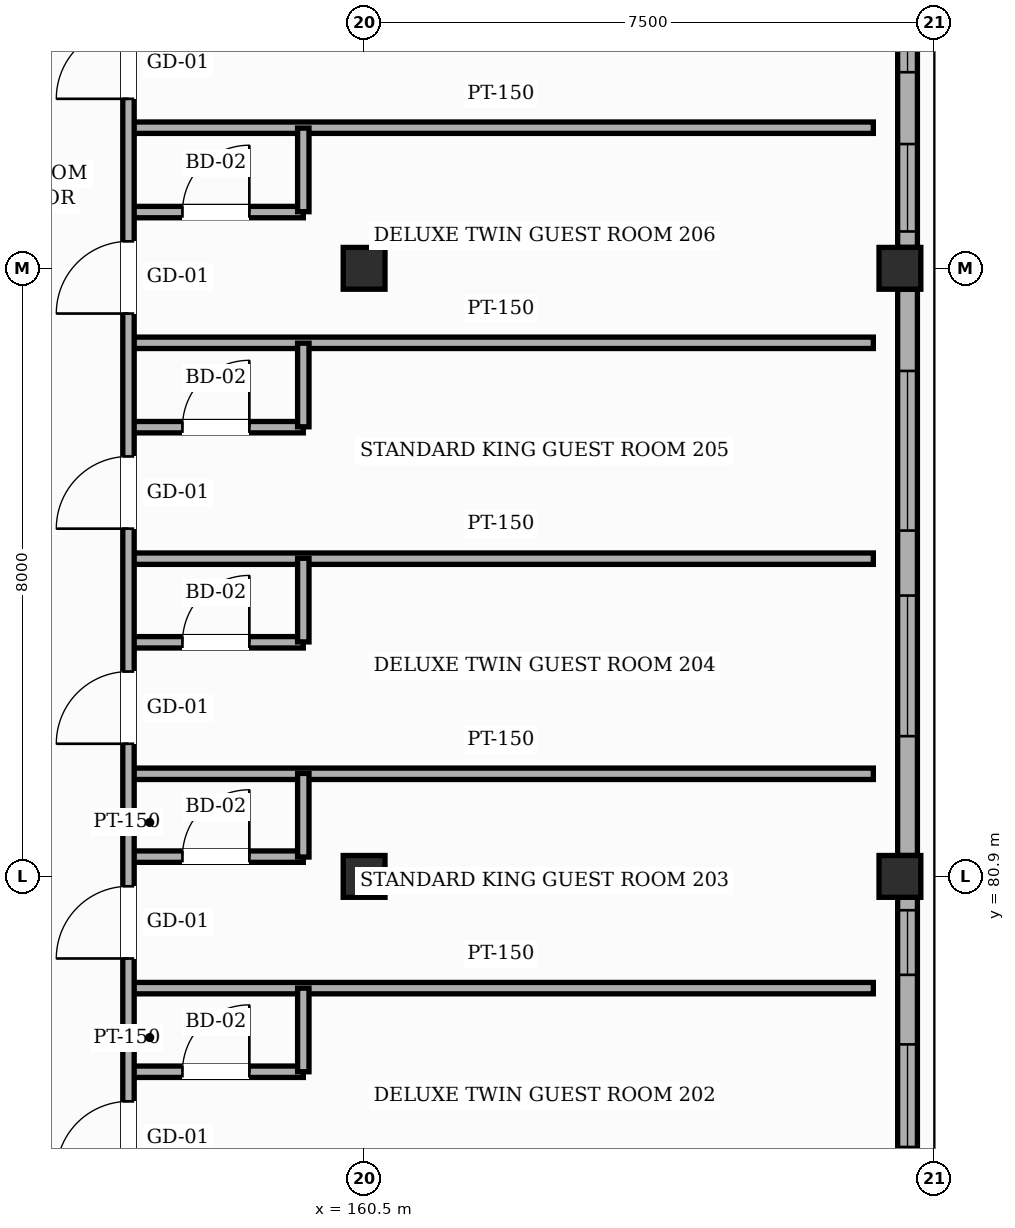
"""IFC4 building model, lengths in metres.
Left out: names, types, materials, properties, quantities, classifications, styles, units other than length and angle.
Written with IfcOpenShell. Run it as: python <this file> out.ifc"""

import sys

from ifc_helpers import new_model, si_unit, direction, frame, frame_2d, origin, origin_2d, place, context, subcontext, project, spatial, rectangle, hollow_rectangle, extrude, element, fill, save


model = new_model("IFC4")
c1 = context("Model", 3, precision=1e-05, world=origin(), true_north=direction((0.0, 1.0)))
c2 = subcontext(c1, "Body", "Model", "MODEL_VIEW")
j1 = project(units=[si_unit("LENGTHUNIT", "METRE"), si_unit("PLANEANGLEUNIT", "RADIAN")], contexts=[c1])
p1 = place(None, origin())
s1 = spatial("IfcSite", under=j1, at=p1, CompositionType="ELEMENT")
p2 = place(p1, origin())
s2 = spatial("IfcBuilding", under=s1, at=p2, CompositionType="ELEMENT")
p3 = place(p2, frame((0.0, 0.0, 31.8)))
s3 = spatial("IfcBuildingStorey", under=s2, at=p3, CompositionType="ELEMENT", Elevation=31.8)
for number, where, z_axis, x_axis in (
    (1, (160.5, 80.9, 0.0), (0.0, 0.0, 1.0), (1.0, 0.0, 0.0)),
    (2, (160.5, 88.9, 0.0), (0.0, 0.0, 1.0), (1.0, 0.0, 0.0)),
    (3, (167.55, 80.9, 0.0), (0.0, 0.0, 1.0), (1.0, 0.0, 0.0)),
    (4, (167.55, 88.9, 0.0), (0.0, 0.0, 1.0), (1.0, 0.0, 0.0)),
):
    element("IfcColumn", number, at=place(p3, frame(where, z_axis=z_axis, x_axis=x_axis)), inside=s3, PredefinedType="COLUMN", context=c2, shape_type="SweptSolid", body=[
        extrude(hollow_rectangle(XDim=0.55, YDim=0.55, WallThickness=0.022, InnerFilletRadius=0.022, OuterFilletRadius=0.044, at=origin_2d()), origin(), (0.0, 0.0, 1.0), 3.6),
    ])
p4 = place(p3, frame((167.65, 80.625, 0.0), z_axis=(0.0, 0.0, 1.0), x_axis=(0.0, -1.0, 0.0)))
e5 = element("IfcWall", 5, at=p4, inside=s3, PredefinedType="SOLIDWALL", context=c2, shape_type="SweptSolid", body=[
    extrude(rectangle(XDim=4.2, YDim=0.26, at=frame_2d((2.1, 0.0))), origin(), (0.0, 0.0, 1.0), 3.365),
])
p5 = place(p4, frame((1.935, 0.0, 0.85)))
e6 = element("IfcOpeningElement", 6, at=p5, cuts=e5, PredefinedType="OPENING", context=c2, shape_type="SweptSolid", body=[
    extrude(rectangle(XDim=1.35, YDim=1.95, at=frame_2d((0.675, 0.975))), frame((0.0, 0.14, 0.0), z_axis=(0.0, -1.0, 0.0), x_axis=(1.0, 0.0, 0.0)), (0.0, 0.0, 1.0), 0.28),
])
p6 = place(p4, frame((0.17, 0.0, 0.85)))
e7 = element("IfcOpeningElement", 7, at=p6, cuts=e5, PredefinedType="OPENING", context=c2, shape_type="SweptSolid", body=[
    extrude(rectangle(XDim=0.85, YDim=1.35, at=frame_2d((0.425, 0.675))), frame((0.0, 0.14, 0.0), z_axis=(0.0, -1.0, 0.0), x_axis=(1.0, 0.0, 0.0)), (0.0, 0.0, 1.0), 0.28),
])
p7 = place(p3, frame((167.65, 88.625, 0.0), z_axis=(0.0, 0.0, 1.0), x_axis=(0.0, -1.0, 0.0)))
e8 = element("IfcWall", 8, at=p7, inside=s3, PredefinedType="SOLIDWALL", context=c2, shape_type="SweptSolid", body=[
    extrude(rectangle(XDim=7.45, YDim=0.26, at=frame_2d((3.725, 0.0))), origin(), (0.0, 0.0, 1.0), 2.755),
])
p8 = place(p7, frame((4.03, 0.0, 0.85)))
e9 = element("IfcOpeningElement", 9, at=p8, cuts=e8, PredefinedType="OPENING", context=c2, shape_type="SweptSolid", body=[
    extrude(rectangle(XDim=1.85, YDim=1.35, at=frame_2d((0.925, 0.675))), frame((0.0, 0.14, 0.0), z_axis=(0.0, -1.0, 0.0), x_axis=(1.0, 0.0, 0.0)), (0.0, 0.0, 1.0), 0.28),
])
p9 = place(p7, frame((1.075, 0.0, 0.85)))
e10 = element("IfcOpeningElement", 10, at=p9, cuts=e8, PredefinedType="OPENING", context=c2, shape_type="SweptSolid", body=[
    extrude(rectangle(XDim=2.1, YDim=1.35, at=frame_2d((1.05, 0.675))), frame((0.0, 0.14, 0.0), z_axis=(0.0, -1.0, 0.0), x_axis=(1.0, 0.0, 0.0)), (0.0, 0.0, 1.0), 0.28),
])
p10 = place(p3, frame((167.65, 96.625, 0.0), z_axis=(0.0, 0.0, 1.0), x_axis=(0.0, -1.0, 0.0)))
e11 = element("IfcWall", 11, at=p10, inside=s3, PredefinedType="SOLIDWALL", context=c2, shape_type="SweptSolid", body=[
    extrude(rectangle(XDim=7.45, YDim=0.26, at=frame_2d((3.725, 0.0))), origin(), (0.0, 0.0, 1.0), 2.755),
])
p11 = place(p10, frame((6.09, 0.0, 0.85)))
e12 = element("IfcOpeningElement", 12, at=p11, cuts=e11, PredefinedType="OPENING", context=c2, shape_type="SweptSolid", body=[
    extrude(rectangle(XDim=1.15, YDim=1.35, at=frame_2d((0.575, 0.675))), frame((0.0, 0.14, 0.0), z_axis=(0.0, -1.0, 0.0), x_axis=(1.0, 0.0, 0.0)), (0.0, 0.0, 1.0), 0.28),
])
p12 = place(p10, frame((3.795, 0.0, 0.85)))
e13 = element("IfcOpeningElement", 13, at=p12, cuts=e11, PredefinedType="OPENING", context=c2, shape_type="SweptSolid", body=[
    extrude(rectangle(XDim=1.35, YDim=1.35, at=frame_2d((0.675, 0.675))), frame((0.0, 0.14, 0.0), z_axis=(0.0, -1.0, 0.0), x_axis=(1.0, 0.0, 0.0)), (0.0, 0.0, 1.0), 0.28),
])
p13 = place(p10, frame((0.865, 0.0, 0.85)))
e14 = element("IfcOpeningElement", 14, at=p13, cuts=e11, PredefinedType="OPENING", context=c2, shape_type="SweptSolid", body=[
    extrude(rectangle(XDim=1.55, YDim=1.35, at=frame_2d((0.775, 0.675))), frame((0.0, 0.14, 0.0), z_axis=(0.0, -1.0, 0.0), x_axis=(1.0, 0.0, 0.0)), (0.0, 0.0, 1.0), 0.28),
])
p14 = place(p3, frame((157.4, 78.33, 0.0), z_axis=(0.0, 0.0, 1.0), x_axis=(1.0, 0.0, 0.0)))
e15 = element("IfcWall", 15, at=p14, inside=s3, PredefinedType="PARTITIONING", context=c2, shape_type="SweptSolid", body=[
    extrude(rectangle(XDim=2.3, YDim=0.15, at=frame_2d((1.15, 0.0))), origin(), (0.0, 0.0, 1.0), 3.365),
])
p15 = place(p14, frame((0.71, 0.0, 0.0)))
e16 = element("IfcOpeningElement", 16, at=p15, cuts=e15, PredefinedType="OPENING", context=c2, shape_type="SweptSolid", body=[
    extrude(rectangle(XDim=0.88, YDim=2.12, at=frame_2d((0.44, 1.06))), frame((0.0, 0.085, 0.0), z_axis=(0.0, -1.0, 0.0), x_axis=(1.0, 0.0, 0.0)), (0.0, 0.0, 1.0), 0.17),
])
p16 = place(p3, frame((157.4, 79.43, 0.0), z_axis=(0.0, 0.0, 1.0), x_axis=(1.0, 0.0, 0.0)))
e17 = element("IfcWall", 17, at=p16, inside=s3, PredefinedType="PARTITIONING", context=c2, shape_type="SweptSolid", body=[
    extrude(rectangle(XDim=9.8, YDim=0.15, at=frame_2d((4.9, 0.0))), origin(), (0.0, 0.0, 1.0), 3.365),
])
p17 = place(p3, frame((157.4, 81.16, 0.0), z_axis=(0.0, 0.0, 1.0), x_axis=(1.0, 0.0, 0.0)))
e18 = element("IfcWall", 18, at=p17, inside=s3, PredefinedType="PARTITIONING", context=c2, shape_type="SweptSolid", body=[
    extrude(rectangle(XDim=2.3, YDim=0.15, at=frame_2d((1.15, 0.0))), origin(), (0.0, 0.0, 1.0), 2.755),
])
p18 = place(p17, frame((0.71, 0.0, 0.0)))
e19 = element("IfcOpeningElement", 19, at=p18, cuts=e18, PredefinedType="OPENING", context=c2, shape_type="SweptSolid", body=[
    extrude(rectangle(XDim=0.88, YDim=2.12, at=frame_2d((0.44, 1.06))), frame((0.0, 0.085, 0.0), z_axis=(0.0, -1.0, 0.0), x_axis=(1.0, 0.0, 0.0)), (0.0, 0.0, 1.0), 0.17),
])
p19 = place(p3, frame((157.4, 82.25, 0.0), z_axis=(0.0, 0.0, 1.0), x_axis=(1.0, 0.0, 0.0)))
e20 = element("IfcWall", 20, at=p19, inside=s3, PredefinedType="PARTITIONING", context=c2, shape_type="SweptSolid", body=[
    extrude(rectangle(XDim=9.8, YDim=0.15, at=frame_2d((4.9, 0.0))), origin(), (0.0, 0.0, 1.0), 3.365),
])
p20 = place(p3, frame((157.4, 83.98, 0.0), z_axis=(0.0, 0.0, 1.0), x_axis=(1.0, 0.0, 0.0)))
e21 = element("IfcWall", 21, at=p20, inside=s3, PredefinedType="PARTITIONING", context=c2, shape_type="SweptSolid", body=[
    extrude(rectangle(XDim=2.3, YDim=0.15, at=frame_2d((1.15, 0.0))), origin(), (0.0, 0.0, 1.0), 3.365),
])
p21 = place(p20, frame((0.71, 0.0, 0.0)))
e22 = element("IfcOpeningElement", 22, at=p21, cuts=e21, PredefinedType="OPENING", context=c2, shape_type="SweptSolid", body=[
    extrude(rectangle(XDim=0.88, YDim=2.12, at=frame_2d((0.44, 1.06))), frame((0.0, 0.085, 0.0), z_axis=(0.0, -1.0, 0.0), x_axis=(1.0, 0.0, 0.0)), (0.0, 0.0, 1.0), 0.17),
])
p22 = place(p3, frame((157.4, 85.08, 0.0), z_axis=(0.0, 0.0, 1.0), x_axis=(1.0, 0.0, 0.0)))
e23 = element("IfcWall", 23, at=p22, inside=s3, PredefinedType="PARTITIONING", context=c2, shape_type="SweptSolid", body=[
    extrude(rectangle(XDim=9.8, YDim=0.15, at=frame_2d((4.9, 0.0))), origin(), (0.0, 0.0, 1.0), 3.005),
])
p23 = place(p3, frame((157.4, 86.81, 0.0), z_axis=(0.0, 0.0, 1.0), x_axis=(1.0, 0.0, 0.0)))
e24 = element("IfcWall", 24, at=p23, inside=s3, PredefinedType="PARTITIONING", context=c2, shape_type="SweptSolid", body=[
    extrude(rectangle(XDim=2.3, YDim=0.15, at=frame_2d((1.15, 0.0))), origin(), (0.0, 0.0, 1.0), 3.365),
])
p24 = place(p23, frame((0.71, 0.0, 0.0)))
e25 = element("IfcOpeningElement", 25, at=p24, cuts=e24, PredefinedType="OPENING", context=c2, shape_type="SweptSolid", body=[
    extrude(rectangle(XDim=0.88, YDim=2.12, at=frame_2d((0.44, 1.06))), frame((0.0, 0.085, 0.0), z_axis=(0.0, -1.0, 0.0), x_axis=(1.0, 0.0, 0.0)), (0.0, 0.0, 1.0), 0.17),
])
p25 = place(p3, frame((157.4, 87.92, 0.0), z_axis=(0.0, 0.0, 1.0), x_axis=(1.0, 0.0, 0.0)))
e26 = element("IfcWall", 26, at=p25, inside=s3, PredefinedType="PARTITIONING", context=c2, shape_type="SweptSolid", body=[
    extrude(rectangle(XDim=9.8, YDim=0.15, at=frame_2d((4.9, 0.0))), origin(), (0.0, 0.0, 1.0), 3.365),
])
p26 = place(p3, frame((157.4, 89.64, 0.0), z_axis=(0.0, 0.0, 1.0), x_axis=(1.0, 0.0, 0.0)))
e27 = element("IfcWall", 27, at=p26, inside=s3, PredefinedType="PARTITIONING", context=c2, shape_type="SweptSolid", body=[
    extrude(rectangle(XDim=2.3, YDim=0.15, at=frame_2d((1.15, 0.0))), origin(), (0.0, 0.0, 1.0), 3.365),
])
p27 = place(p26, frame((0.71, 0.0, 0.0)))
e28 = element("IfcOpeningElement", 28, at=p27, cuts=e27, PredefinedType="OPENING", context=c2, shape_type="SweptSolid", body=[
    extrude(rectangle(XDim=0.88, YDim=2.12, at=frame_2d((0.44, 1.06))), frame((0.0, 0.085, 0.0), z_axis=(0.0, -1.0, 0.0), x_axis=(1.0, 0.0, 0.0)), (0.0, 0.0, 1.0), 0.17),
])
p28 = place(p3, frame((157.4, 90.75, 0.0), z_axis=(0.0, 0.0, 1.0), x_axis=(1.0, 0.0, 0.0)))
e29 = element("IfcWall", 29, at=p28, inside=s3, PredefinedType="PARTITIONING", context=c2, shape_type="SweptSolid", body=[
    extrude(rectangle(XDim=9.8, YDim=0.15, at=frame_2d((4.9, 0.0))), origin(), (0.0, 0.0, 1.0), 3.365),
])
p29 = place(p3, frame((157.4, 76.6, 0.0), z_axis=(0.0, 0.0, 1.0), x_axis=(0.0, 1.0, 0.0)))
e30 = element("IfcWall", 30, at=p29, inside=s3, PredefinedType="PARTITIONING", context=c2, shape_type="SweptSolid", body=[
    extrude(rectangle(XDim=19.8, YDim=0.15, at=frame_2d((9.9, 0.0))), origin(), (0.0, 0.0, 1.0), 3.365),
])
p30 = place(p29, frame((0.39, 0.0, 0.0)))
e31 = element("IfcOpeningElement", 31, at=p30, cuts=e30, PredefinedType="OPENING", context=c2, shape_type="SweptSolid", body=[
    extrude(rectangle(XDim=0.95, YDim=2.15, at=frame_2d((0.475, 1.075))), frame((0.0, 0.085, 0.0), z_axis=(0.0, -1.0, 0.0), x_axis=(1.0, 0.0, 0.0)), (0.0, 0.0, 1.0), 0.17),
])
p31 = place(p29, frame((3.22, 0.0, 0.0)))
e32 = element("IfcOpeningElement", 32, at=p31, cuts=e30, PredefinedType="OPENING", context=c2, shape_type="SweptSolid", body=[
    extrude(rectangle(XDim=0.95, YDim=2.15, at=frame_2d((0.475, 1.075))), frame((0.0, 0.085, 0.0), z_axis=(0.0, -1.0, 0.0), x_axis=(1.0, 0.0, 0.0)), (0.0, 0.0, 1.0), 0.17),
])
p32 = place(p29, frame((6.045, 0.0, 0.0)))
e33 = element("IfcOpeningElement", 33, at=p32, cuts=e30, PredefinedType="OPENING", context=c2, shape_type="SweptSolid", body=[
    extrude(rectangle(XDim=0.95, YDim=2.15, at=frame_2d((0.475, 1.075))), frame((0.0, 0.085, 0.0), z_axis=(0.0, -1.0, 0.0), x_axis=(1.0, 0.0, 0.0)), (0.0, 0.0, 1.0), 0.17),
])
p33 = place(p29, frame((8.875, 0.0, 0.0)))
e34 = element("IfcOpeningElement", 34, at=p33, cuts=e30, PredefinedType="OPENING", context=c2, shape_type="SweptSolid", body=[
    extrude(rectangle(XDim=0.95, YDim=2.15, at=frame_2d((0.475, 1.075))), frame((0.0, 0.085, 0.0), z_axis=(0.0, -1.0, 0.0), x_axis=(1.0, 0.0, 0.0)), (0.0, 0.0, 1.0), 0.17),
])
p34 = place(p29, frame((11.705, 0.0, 0.0)))
e35 = element("IfcOpeningElement", 35, at=p34, cuts=e30, PredefinedType="OPENING", context=c2, shape_type="SweptSolid", body=[
    extrude(rectangle(XDim=0.95, YDim=2.15, at=frame_2d((0.475, 1.075))), frame((0.0, 0.085, 0.0), z_axis=(0.0, -1.0, 0.0), x_axis=(1.0, 0.0, 0.0)), (0.0, 0.0, 1.0), 0.17),
])
p35 = place(p29, frame((14.53, 0.0, 0.0)))
e36 = element("IfcOpeningElement", 36, at=p35, cuts=e30, PredefinedType="OPENING", context=c2, shape_type="SweptSolid", body=[
    extrude(rectangle(XDim=0.95, YDim=2.15, at=frame_2d((0.475, 1.075))), frame((0.0, 0.085, 0.0), z_axis=(0.0, -1.0, 0.0), x_axis=(1.0, 0.0, 0.0)), (0.0, 0.0, 1.0), 0.17),
])
p36 = place(p29, frame((17.36, 0.0, 0.0)))
e37 = element("IfcOpeningElement", 37, at=p36, cuts=e30, PredefinedType="OPENING", context=c2, shape_type="SweptSolid", body=[
    extrude(rectangle(XDim=0.95, YDim=2.15, at=frame_2d((0.475, 1.075))), frame((0.0, 0.085, 0.0), z_axis=(0.0, -1.0, 0.0), x_axis=(1.0, 0.0, 0.0)), (0.0, 0.0, 1.0), 0.17),
])
for number, where, z_axis, x_axis in (
    (38, (159.7, 78.33, 0.0), (0.0, 0.0, 1.0), (0.0, 1.0, 0.0)),
    (39, (159.7, 81.155, 0.0), (0.0, 0.0, 1.0), (0.0, 1.0, 0.0)),
    (40, (159.7, 83.985, 0.0), (0.0, 0.0, 1.0), (0.0, 1.0, 0.0)),
):
    element("IfcWall", number, at=place(p3, frame(where, z_axis=z_axis, x_axis=x_axis)), inside=s3, PredefinedType="PARTITIONING", context=c2, shape_type="SweptSolid", body=[
        extrude(rectangle(XDim=1.1, YDim=0.15, at=frame_2d((0.55, 0.0))), origin(), (0.0, 0.0, 1.0), 3.365),
    ])
for number, where, z_axis, x_axis in (
    (41, (159.7, 86.815, 0.0), (0.0, 0.0, 1.0), (0.0, 1.0, 0.0)),
    (42, (159.7, 89.645, 0.0), (0.0, 0.0, 1.0), (0.0, 1.0, 0.0)),
):
    element("IfcWall", number, at=place(p3, frame(where, z_axis=z_axis, x_axis=x_axis)), inside=s3, PredefinedType="PARTITIONING", context=c2, shape_type="SweptSolid", body=[
        extrude(rectangle(XDim=1.1, YDim=0.15, at=frame_2d((0.55, 0.0))), origin(), (0.0, 0.0, 1.0), 3.365),
    ])
p37 = place(p5, origin())
e43 = element("IfcWindow", 43, at=p37, inside=s3, PartitioningType="SINGLE_PANEL", PredefinedType="WINDOW", context=c2, shape_type="SweptSolid", body=[
    extrude(rectangle(XDim=1.35, YDim=1.95, at=frame_2d((0.675, 0.975))), frame((0.0, 0.03, 0.0), z_axis=(0.0, -1.0, 0.0), x_axis=(1.0, 0.0, 0.0)), (0.0, 0.0, 1.0), 0.06),
])
fill(e6, e43)
p38 = place(p6, origin())
e44 = element("IfcWindow", 44, at=p38, inside=s3, PartitioningType="SINGLE_PANEL", PredefinedType="WINDOW", context=c2, shape_type="SweptSolid", body=[
    extrude(rectangle(XDim=0.85, YDim=1.35, at=frame_2d((0.425, 0.675))), frame((0.0, 0.03, 0.0), z_axis=(0.0, -1.0, 0.0), x_axis=(1.0, 0.0, 0.0)), (0.0, 0.0, 1.0), 0.06),
])
fill(e7, e44)
p39 = place(p8, origin())
e45 = element("IfcWindow", 45, at=p39, inside=s3, PartitioningType="SINGLE_PANEL", PredefinedType="WINDOW", context=c2, shape_type="SweptSolid", body=[
    extrude(rectangle(XDim=1.85, YDim=1.35, at=frame_2d((0.925, 0.675))), frame((0.0, 0.03, 0.0), z_axis=(0.0, -1.0, 0.0), x_axis=(1.0, 0.0, 0.0)), (0.0, 0.0, 1.0), 0.06),
])
fill(e9, e45)
p40 = place(p9, origin())
e46 = element("IfcWindow", 46, at=p40, inside=s3, PartitioningType="SINGLE_PANEL", PredefinedType="WINDOW", context=c2, shape_type="SweptSolid", body=[
    extrude(rectangle(XDim=2.1, YDim=1.35, at=frame_2d((1.05, 0.675))), frame((0.0, 0.03, 0.0), z_axis=(0.0, -1.0, 0.0), x_axis=(1.0, 0.0, 0.0)), (0.0, 0.0, 1.0), 0.06),
])
fill(e10, e46)
p41 = place(p11, origin())
e47 = element("IfcWindow", 47, at=p41, inside=s3, PartitioningType="SINGLE_PANEL", PredefinedType="WINDOW", context=c2, shape_type="SweptSolid", body=[
    extrude(rectangle(XDim=1.15, YDim=1.35, at=frame_2d((0.575, 0.675))), frame((0.0, 0.03, 0.0), z_axis=(0.0, -1.0, 0.0), x_axis=(1.0, 0.0, 0.0)), (0.0, 0.0, 1.0), 0.06),
])
fill(e12, e47)
p42 = place(p12, origin())
e48 = element("IfcWindow", 48, at=p42, inside=s3, PartitioningType="SINGLE_PANEL", PredefinedType="WINDOW", context=c2, shape_type="SweptSolid", body=[
    extrude(rectangle(XDim=1.35, YDim=1.35, at=frame_2d((0.675, 0.675))), frame((0.0, 0.03, 0.0), z_axis=(0.0, -1.0, 0.0), x_axis=(1.0, 0.0, 0.0)), (0.0, 0.0, 1.0), 0.06),
])
fill(e13, e48)
p43 = place(p30, origin())
e49 = element("IfcDoor", 49, at=p43, inside=s3, OperationType="SINGLE_SWING_LEFT", PredefinedType="DOOR", context=c2, shape_type="SweptSolid", body=[
    extrude(rectangle(XDim=0.95, YDim=2.15, at=frame_2d((0.475, 1.075))), frame((0.0, 0.025, 0.0), z_axis=(0.0, -1.0, 0.0), x_axis=(1.0, 0.0, 0.0)), (0.0, 0.0, 1.0), 0.05),
])
fill(e31, e49)
p44 = place(p15, origin())
e50 = element("IfcDoor", 50, at=p44, inside=s3, OperationType="SINGLE_SWING_RIGHT", PredefinedType="DOOR", context=c2, shape_type="SweptSolid", body=[
    extrude(rectangle(XDim=0.88, YDim=2.12, at=frame_2d((0.44, 1.06))), frame((0.0, 0.025, 0.0), z_axis=(0.0, -1.0, 0.0), x_axis=(1.0, 0.0, 0.0)), (0.0, 0.0, 1.0), 0.05),
])
fill(e16, e50)
p45 = place(p31, origin())
e51 = element("IfcDoor", 51, at=p45, inside=s3, OperationType="SINGLE_SWING_LEFT", PredefinedType="DOOR", context=c2, shape_type="SweptSolid", body=[
    extrude(rectangle(XDim=0.95, YDim=2.15, at=frame_2d((0.475, 1.075))), frame((0.0, 0.025, 0.0), z_axis=(0.0, -1.0, 0.0), x_axis=(1.0, 0.0, 0.0)), (0.0, 0.0, 1.0), 0.05),
])
fill(e32, e51)
p46 = place(p18, origin())
e52 = element("IfcDoor", 52, at=p46, inside=s3, OperationType="SINGLE_SWING_RIGHT", PredefinedType="DOOR", context=c2, shape_type="SweptSolid", body=[
    extrude(rectangle(XDim=0.88, YDim=2.12, at=frame_2d((0.44, 1.06))), frame((0.0, 0.025, 0.0), z_axis=(0.0, -1.0, 0.0), x_axis=(1.0, 0.0, 0.0)), (0.0, 0.0, 1.0), 0.05),
])
fill(e19, e52)
p47 = place(p32, origin())
e53 = element("IfcDoor", 53, at=p47, inside=s3, OperationType="SINGLE_SWING_LEFT", PredefinedType="DOOR", context=c2, shape_type="SweptSolid", body=[
    extrude(rectangle(XDim=0.95, YDim=2.15, at=frame_2d((0.475, 1.075))), frame((0.0, 0.025, 0.0), z_axis=(0.0, -1.0, 0.0), x_axis=(1.0, 0.0, 0.0)), (0.0, 0.0, 1.0), 0.05),
])
fill(e33, e53)
p48 = place(p21, origin())
e54 = element("IfcDoor", 54, at=p48, inside=s3, OperationType="SINGLE_SWING_RIGHT", PredefinedType="DOOR", context=c2, shape_type="SweptSolid", body=[
    extrude(rectangle(XDim=0.88, YDim=2.12, at=frame_2d((0.44, 1.06))), frame((0.0, 0.025, 0.0), z_axis=(0.0, -1.0, 0.0), x_axis=(1.0, 0.0, 0.0)), (0.0, 0.0, 1.0), 0.05),
])
fill(e22, e54)
p49 = place(p33, origin())
e55 = element("IfcDoor", 55, at=p49, inside=s3, OperationType="SINGLE_SWING_LEFT", PredefinedType="DOOR", context=c2, shape_type="SweptSolid", body=[
    extrude(rectangle(XDim=0.95, YDim=2.15, at=frame_2d((0.475, 1.075))), frame((0.0, 0.025, 0.0), z_axis=(0.0, -1.0, 0.0), x_axis=(1.0, 0.0, 0.0)), (0.0, 0.0, 1.0), 0.05),
])
fill(e34, e55)
p50 = place(p24, origin())
e56 = element("IfcDoor", 56, at=p50, inside=s3, OperationType="SINGLE_SWING_RIGHT", PredefinedType="DOOR", context=c2, shape_type="SweptSolid", body=[
    extrude(rectangle(XDim=0.88, YDim=2.12, at=frame_2d((0.44, 1.06))), frame((0.0, 0.025, 0.0), z_axis=(0.0, -1.0, 0.0), x_axis=(1.0, 0.0, 0.0)), (0.0, 0.0, 1.0), 0.05),
])
fill(e25, e56)
p51 = place(p34, origin())
e57 = element("IfcDoor", 57, at=p51, inside=s3, OperationType="SINGLE_SWING_LEFT", PredefinedType="DOOR", context=c2, shape_type="SweptSolid", body=[
    extrude(rectangle(XDim=0.95, YDim=2.15, at=frame_2d((0.475, 1.075))), frame((0.0, 0.025, 0.0), z_axis=(0.0, -1.0, 0.0), x_axis=(1.0, 0.0, 0.0)), (0.0, 0.0, 1.0), 0.05),
])
fill(e35, e57)
p52 = place(p27, origin())
e58 = element("IfcDoor", 58, at=p52, inside=s3, OperationType="SINGLE_SWING_RIGHT", PredefinedType="DOOR", context=c2, shape_type="SweptSolid", body=[
    extrude(rectangle(XDim=0.88, YDim=2.12, at=frame_2d((0.44, 1.06))), frame((0.0, 0.025, 0.0), z_axis=(0.0, -1.0, 0.0), x_axis=(1.0, 0.0, 0.0)), (0.0, 0.0, 1.0), 0.05),
])
fill(e28, e58)
p53 = place(p35, origin())
e59 = element("IfcDoor", 59, at=p53, inside=s3, OperationType="SINGLE_SWING_LEFT", PredefinedType="DOOR", context=c2, shape_type="SweptSolid", body=[
    extrude(rectangle(XDim=0.95, YDim=2.15, at=frame_2d((0.475, 1.075))), frame((0.0, 0.025, 0.0), z_axis=(0.0, -1.0, 0.0), x_axis=(1.0, 0.0, 0.0)), (0.0, 0.0, 1.0), 0.05),
])
fill(e36, e59)
save(model, sys.argv[1])
